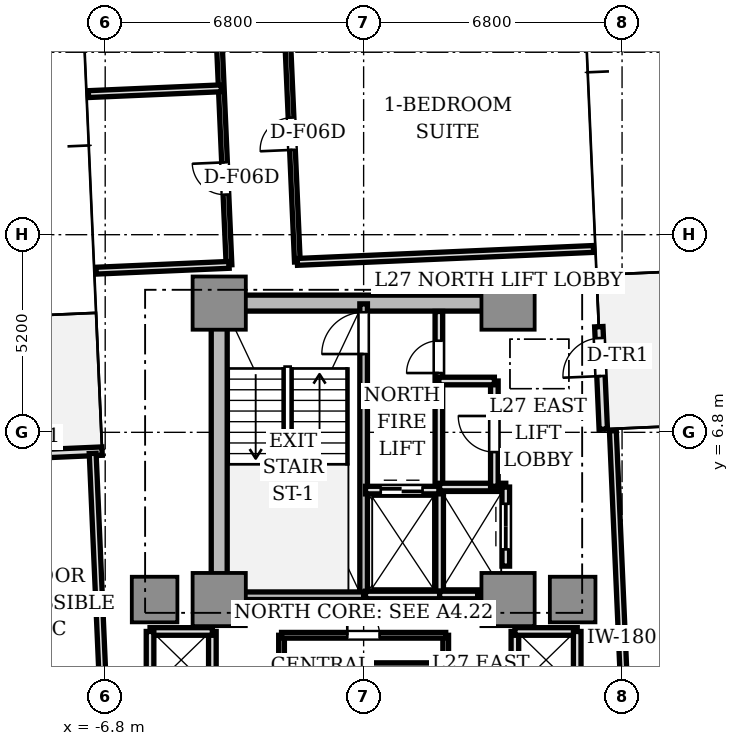
"""IFC4 building model, lengths in metres.
Left out: names, types, materials, properties, quantities, classifications, styles, units other than length and angle.
Written with IfcOpenShell. Run it as: python <this file> out.ifc"""

import sys

from ifc_helpers import new_model, si_unit, direction, frame, frame_2d, origin, origin_2d, place, context, subcontext, project, spatial, rectangle, extrude, source, transform, mapped, element, fill, save


model = new_model("IFC4")
c1 = context("Model", 3, precision=1e-05, world=origin(), true_north=direction((0.0, 1.0)))
c2 = subcontext(c1, "Body", "Model", "MODEL_VIEW")
j1 = project(units=[si_unit("LENGTHUNIT", "METRE"), si_unit("PLANEANGLEUNIT", "RADIAN")], contexts=[c1])
p1 = place(None, origin())
s1 = spatial("IfcSite", under=j1, at=p1, CompositionType="ELEMENT")
p2 = place(p1, origin())
s2 = spatial("IfcBuilding", under=s1, at=p2, CompositionType="ELEMENT")
p3 = place(p2, frame((0.0, 0.0, 100.25)))
s3 = spatial("IfcBuildingStorey", under=s2, at=p3, CompositionType="ELEMENT", Elevation=100.25)
p4 = place(p3, frame((-3.55, 10.2, 0.0), z_axis=(0.0, 0.0, 1.0), x_axis=(1.0, 0.0, 0.0)))
e1 = element("IfcWall", 1, at=p4, inside=s3, PredefinedType="SHEAR", context=c2, shape_type="SweptSolid", body=[
    extrude(rectangle(XDim=7.1, YDim=0.42, at=frame_2d((3.55, 0.0))), origin(), (0.0, 0.0, 1.0), 3.11),
])
p5 = place(p3, frame((-3.8, 2.85, 0.0), z_axis=(0.0, 0.0, 1.0), x_axis=(0.0, 1.0, 0.0)))
e2 = element("IfcWall", 2, at=p5, inside=s3, PredefinedType="SHEAR", context=c2, shape_type="SweptSolid", body=[
    extrude(rectangle(XDim=6.9, YDim=0.42, at=frame_2d((3.45, 0.0))), origin(), (0.0, 0.0, 1.0), 3.11),
])
m1 = source(origin(), c2, "Body", "SweptSolid", [
    extrude(rectangle(XDim=1.4, YDim=1.4, at=origin_2d()), origin(), (0.0, 0.0, 1.0), 3.11),
])
for number, where, z_axis, x_axis in (
    (3, (-3.8, 2.4, 0.0), (0.0, 0.0, 1.0), (1.0, 0.0, 0.0)),
    (4, (3.8, 2.4, 0.0), (0.0, 0.0, 1.0), (1.0, 0.0, 0.0)),
    (5, (-3.8, 10.2, 0.0), (0.0, 0.0, 1.0), (1.0, 0.0, 0.0)),
    (6, (3.8, 10.2, 0.0), (0.0, 0.0, 1.0), (1.0, 0.0, 0.0)),
):
    element("IfcColumn", number, at=place(p3, frame(where, z_axis=z_axis, x_axis=x_axis)), inside=s3, PredefinedType="COLUMN", context=c2, shape_type="MappedRepresentation", body=[
        mapped(m1, transform((0.0, 0.0, 0.0), scale=1.0)),
    ])
m2 = source(origin(), c2, "Body", "SweptSolid", [
    extrude(rectangle(XDim=1.2, YDim=1.2, at=origin_2d()), origin(), (0.0, 0.0, 1.0), 3.11),
])
for number, where, z_axis, x_axis in (
    (7, (5.5, 2.4, 0.0), (0.0, 0.0, 1.0), (1.0, 0.0, 0.0)),
    (8, (-5.5, 2.4, 0.0), (0.0, 0.0, 1.0), (1.0, 0.0, 0.0)),
):
    element("IfcColumn", number, at=place(p3, frame(where, z_axis=z_axis, x_axis=x_axis)), inside=s3, PredefinedType="COLUMN", context=c2, shape_type="MappedRepresentation", body=[
        mapped(m2, transform((0.0, 0.0, 0.0), scale=1.0)),
    ])
p6 = place(p3, frame((6.306, 6.882, 0.0), z_axis=(0.0, 0.0, 1.0), x_axis=(-0.043672655174, 0.999045894436, 0.0)))
e9 = element("IfcWall", 9, at=p6, inside=s3, PredefinedType="STANDARD", context=c2, shape_type="SweptSolid", body=[
    extrude(rectangle(XDim=2.7, YDim=0.22, at=frame_2d((1.35, 0.0))), origin(), (0.0, 0.0, 1.0), 3.11),
])
p7 = place(p6, frame((1.4, 0.0, 0.0)))
e10 = element("IfcOpeningElement", 10, at=p7, cuts=e9, PredefinedType="OPENING", context=c2, shape_type="SweptSolid", body=[
    extrude(rectangle(XDim=1.0, YDim=2.2, at=frame_2d((0.5, 1.1))), frame((0.0, 0.12, 0.0), z_axis=(0.0, -1.0, 0.0), x_axis=(1.0, 0.0, 0.0)), (0.0, 0.0, 1.0), 0.24),
])
p8 = place(p3, frame((-6.882, 6.306, 0.0), z_axis=(0.0, 0.0, 1.0), x_axis=(-0.999045894436, -0.043672655174, 0.0)))
e11 = element("IfcWall", 11, at=p8, inside=s3, PredefinedType="STANDARD", context=c2, shape_type="SweptSolid", body=[
    extrude(rectangle(XDim=2.7, YDim=0.22, at=frame_2d((1.35, 0.0))), origin(), (0.0, 0.0, 1.0), 3.11),
])
p9 = place(p8, frame((1.4, 0.0, 0.0)))
e12 = element("IfcOpeningElement", 12, at=p9, cuts=e11, PredefinedType="OPENING", context=c2, shape_type="SweptSolid", body=[
    extrude(rectangle(XDim=1.0, YDim=2.2, at=frame_2d((0.5, 1.1))), frame((0.0, 0.12, 0.0), z_axis=(0.0, -1.0, 0.0), x_axis=(1.0, 0.0, 0.0)), (0.0, 0.0, 1.0), 0.24),
])
p10 = place(p3, frame((0.0, 2.5, 0.0), z_axis=(0.0, 0.0, 1.0), x_axis=(0.0, 1.0, 0.0)))
e13 = element("IfcWall", 13, at=p10, inside=s3, PredefinedType="SOLIDWALL", context=c2, shape_type="SweptSolid", body=[
    extrude(rectangle(XDim=7.68, YDim=0.2, at=frame_2d((3.84, 0.0))), origin(), (0.0, 0.0, 1.0), 3.11),
])
p11 = place(p10, frame((6.36, 0.0, 0.0)))
e14 = element("IfcOpeningElement", 14, at=p11, cuts=e13, PredefinedType="OPENING", context=c2, shape_type="SweptSolid", body=[
    extrude(rectangle(XDim=1.1, YDim=2.15, at=frame_2d((0.55, 1.075))), frame((0.0, 0.11, 0.0), z_axis=(0.0, -1.0, 0.0), x_axis=(1.0, 0.0, 0.0)), (0.0, 0.0, 1.0), 0.22),
])
p12 = place(p3, frame((-3.72, 2.5, 0.0), z_axis=(0.0, 0.0, 1.0), x_axis=(1.0, 0.0, 0.0)))
e15 = element("IfcWall", 15, at=p12, inside=s3, PredefinedType="SOLIDWALL", context=c2, shape_type="SweptSolid", body=[
    extrude(rectangle(XDim=3.72, YDim=0.2, at=frame_2d((1.86, 0.0))), origin(), (0.0, 0.0, 1.0), 3.11),
])
p13 = place(p3, frame((1.98, 5.32, 0.0), z_axis=(0.0, 0.0, 1.0), x_axis=(0.0, 1.0, 0.0)))
e16 = element("IfcWall", 16, at=p13, inside=s3, PredefinedType="SOLIDWALL", context=c2, shape_type="SweptSolid", body=[
    extrude(rectangle(XDim=4.66, YDim=0.2, at=frame_2d((2.33, 0.0))), origin(), (0.0, 0.0, 1.0), 2.66),
])
p14 = place(p13, frame((3.04, 0.0, 0.0)))
e17 = element("IfcOpeningElement", 17, at=p14, cuts=e16, PredefinedType="OPENING", context=c2, shape_type="SweptSolid", body=[
    extrude(rectangle(XDim=0.85, YDim=2.1, at=frame_2d((0.425, 1.05))), frame((0.0, 0.11, 0.0), z_axis=(0.0, -1.0, 0.0), x_axis=(1.0, 0.0, 0.0)), (0.0, 0.0, 1.0), 0.22),
])
p15 = place(p3, frame((2.0, 2.5, 0.0), z_axis=(0.0, 0.0, 1.0), x_axis=(0.0, 1.0, 0.0)))
e18 = element("IfcWall", 18, at=p15, inside=s3, PredefinedType="SOLIDWALL", context=c2, shape_type="SweptSolid", body=[
    extrude(rectangle(XDim=2.78, YDim=0.2, at=frame_2d((1.39, 0.0))), origin(), (0.0, 0.0, 1.0), 2.66),
])
p16 = place(p3, frame((0.05, 2.52, 0.0), z_axis=(0.0, 0.0, 1.0), x_axis=(1.0, 0.0, 0.0)))
e19 = element("IfcWall", 19, at=p16, inside=s3, PredefinedType="SOLIDWALL", context=c2, shape_type="SweptSolid", body=[
    extrude(rectangle(XDim=1.95, YDim=0.2, at=frame_2d((0.975, 0.0))), origin(), (0.0, 0.0, 1.0), 2.66),
])
p17 = place(p3, frame((0.05, 5.28, 0.0), z_axis=(0.0, 0.0, 1.0), x_axis=(1.0, 0.0, 0.0)))
e20 = element("IfcWall", 20, at=p17, inside=s3, PredefinedType="SOLIDWALL", context=c2, shape_type="SweptSolid", body=[
    extrude(rectangle(XDim=1.93, YDim=0.2, at=frame_2d((0.965, 0.0))), origin(), (0.0, 0.0, 1.0), 2.66),
])
p18 = place(p17, frame((0.4, 0.0, 0.0)))
e21 = element("IfcOpeningElement", 21, at=p18, cuts=e20, PredefinedType="OPENING", context=c2, shape_type="SweptSolid", body=[
    extrude(rectangle(XDim=1.1, YDim=2.2, at=frame_2d((0.55, 1.1))), frame((0.0, 0.11, 0.0), z_axis=(0.0, -1.0, 0.0), x_axis=(1.0, 0.0, 0.0)), (0.0, 0.0, 1.0), 0.22),
])
p19 = place(p3, frame((2.0, 2.52, 0.0), z_axis=(0.0, 0.0, 1.0), x_axis=(1.0, 0.0, 0.0)))
e22 = element("IfcWall", 22, at=p19, inside=s3, PredefinedType="SOLIDWALL", context=c2, shape_type="SweptSolid", body=[
    extrude(rectangle(XDim=1.0, YDim=0.2, at=frame_2d((0.5, 0.0))), origin(), (0.0, 0.0, 1.0), 2.66),
])
p20 = place(p3, frame((2.0, 5.36, 0.0), z_axis=(0.0, 0.0, 1.0), x_axis=(1.0, 0.0, 0.0)))
e23 = element("IfcWall", 23, at=p20, inside=s3, PredefinedType="SOLIDWALL", context=c2, shape_type="SweptSolid", body=[
    extrude(rectangle(XDim=1.74, YDim=0.2, at=frame_2d((0.87, 0.0))), origin(), (0.0, 0.0, 1.0), 2.66),
])
p21 = place(p3, frame((3.74, 3.28, 0.0), z_axis=(0.0, 0.0, 1.0), x_axis=(0.0, 1.0, 0.0)))
e24 = element("IfcWall", 24, at=p21, inside=s3, PredefinedType="SOLIDWALL", context=c2, shape_type="SweptSolid", body=[
    extrude(rectangle(XDim=2.08, YDim=0.2, at=frame_2d((1.04, 0.0))), origin(), (0.0, 0.0, 1.0), 2.66),
])
p22 = place(p21, frame((0.44, 0.0, 0.0)))
e25 = element("IfcOpeningElement", 25, at=p22, cuts=e24, PredefinedType="OPENING", context=c2, shape_type="SweptSolid", body=[
    extrude(rectangle(XDim=1.2, YDim=2.2, at=frame_2d((0.6, 1.1))), frame((0.0, 0.11, 0.0), z_axis=(0.0, -1.0, 0.0), x_axis=(1.0, 0.0, 0.0)), (0.0, 0.0, 1.0), 0.22),
])
p23 = place(p3, frame((3.98, -1.56, 0.0), z_axis=(0.0, 0.0, 1.0), x_axis=(0.0, 1.0, 0.0)))
e26 = element("IfcWall", 26, at=p23, inside=s3, PredefinedType="SOLIDWALL", context=c2, shape_type="SweptSolid", body=[
    extrude(rectangle(XDim=3.12, YDim=0.2, at=frame_2d((1.56, 0.0))), origin(), (0.0, 0.0, 1.0), 2.28),
])
p24 = place(p3, frame((3.98, 1.56, 0.0), z_axis=(0.0, 0.0, 1.0), x_axis=(1.0, 0.0, 0.0)))
e27 = element("IfcWall", 27, at=p24, inside=s3, PredefinedType="SOLIDWALL", context=c2, shape_type="SweptSolid", body=[
    extrude(rectangle(XDim=1.64, YDim=0.2, at=frame_2d((0.82, 0.0))), origin(), (0.0, 0.0, 1.0), 2.66),
])
p25 = place(p3, frame((5.62, 0.0, 0.0), z_axis=(0.0, 0.0, 1.0), x_axis=(0.0, 1.0, 0.0)))
e28 = element("IfcWall", 28, at=p25, inside=s3, PredefinedType="SOLIDWALL", context=c2, shape_type="SweptSolid", body=[
    extrude(rectangle(XDim=1.56, YDim=0.2, at=frame_2d((0.78, 0.0))), origin(), (0.0, 0.0, 1.0), 2.66),
])
p26 = place(p3, frame((-3.98, -1.56, 0.0), z_axis=(0.0, 0.0, 1.0), x_axis=(0.0, 1.0, 0.0)))
e29 = element("IfcWall", 29, at=p26, inside=s3, PredefinedType="SOLIDWALL", context=c2, shape_type="SweptSolid", body=[
    extrude(rectangle(XDim=3.12, YDim=0.2, at=frame_2d((1.56, 0.0))), origin(), (0.0, 0.0, 1.0), 2.28),
])
p27 = place(p3, frame((-5.62, 1.56, 0.0), z_axis=(0.0, 0.0, 1.0), x_axis=(1.0, 0.0, 0.0)))
e30 = element("IfcWall", 30, at=p27, inside=s3, PredefinedType="SOLIDWALL", context=c2, shape_type="SweptSolid", body=[
    extrude(rectangle(XDim=1.64, YDim=0.2, at=frame_2d((0.82, 0.0))), origin(), (0.0, 0.0, 1.0), 2.66),
])
p28 = place(p3, frame((-5.62, 0.0, 0.0), z_axis=(0.0, 0.0, 1.0), x_axis=(0.0, 1.0, 0.0)))
e31 = element("IfcWall", 31, at=p28, inside=s3, PredefinedType="SOLIDWALL", context=c2, shape_type="SweptSolid", body=[
    extrude(rectangle(XDim=1.56, YDim=0.2, at=frame_2d((0.78, 0.0))), origin(), (0.0, 0.0, 1.0), 2.66),
])
p29 = place(p3, frame((3.44, 5.38, 0.0), z_axis=(0.0, 0.0, 1.0), x_axis=(0.0, 1.0, 0.0)))
e32 = element("IfcWall", 32, at=p29, inside=s3, PredefinedType="SOLIDWALL", context=c2, shape_type="SweptSolid", body=[
    extrude(rectangle(XDim=2.77, YDim=0.2, at=frame_2d((1.385, 0.0))), origin(), (0.0, 0.0, 1.0), 2.66),
])
p30 = place(p29, frame((0.9, 0.0, 0.0)))
e33 = element("IfcOpeningElement", 33, at=p30, cuts=e32, PredefinedType="OPENING", context=c2, shape_type="SweptSolid", body=[
    extrude(rectangle(XDim=0.95, YDim=2.15, at=frame_2d((0.475, 1.075))), frame((0.0, 0.11, 0.0), z_axis=(0.0, -1.0, 0.0), x_axis=(1.0, 0.0, 0.0)), (0.0, 0.0, 1.0), 0.22),
])
p31 = place(p3, frame((1.98, 8.15, 0.0), z_axis=(0.0, 0.0, 1.0), x_axis=(1.0, 0.0, 0.0)))
e34 = element("IfcWall", 34, at=p31, inside=s3, PredefinedType="SOLIDWALL", context=c2, shape_type="SweptSolid", body=[
    extrude(rectangle(XDim=1.46, YDim=0.2, at=frame_2d((0.73, 0.0))), origin(), (0.0, 0.0, 1.0), 2.66),
])
p32 = place(p3, frame((2.16, -1.46, 0.0), z_axis=(0.0, 0.0, 1.0), x_axis=(0.0, 1.0, 0.0)))
e35 = element("IfcWall", 35, at=p32, inside=s3, PredefinedType="PARTITIONING", context=c2, shape_type="SweptSolid", body=[
    extrude(rectangle(XDim=2.92, YDim=0.15, at=frame_2d((1.46, 0.0))), origin(), (0.0, 0.0, 1.0), 2.66),
])
p33 = place(p32, frame((1.035, 0.0, 0.0)))
e36 = element("IfcOpeningElement", 36, at=p33, cuts=e35, PredefinedType="OPENING", context=c2, shape_type="SweptSolid", body=[
    extrude(rectangle(XDim=0.85, YDim=2.1, at=frame_2d((0.425, 1.05))), frame((0.0, 0.085, 0.0), z_axis=(0.0, -1.0, 0.0), x_axis=(1.0, 0.0, 0.0)), (0.0, 0.0, 1.0), 0.17),
])
p34 = place(p3, frame((-2.16, -1.46, 0.0), z_axis=(0.0, 0.0, 1.0), x_axis=(0.0, 1.0, 0.0)))
e37 = element("IfcWall", 37, at=p34, inside=s3, PredefinedType="PARTITIONING", context=c2, shape_type="SweptSolid", body=[
    extrude(rectangle(XDim=2.92, YDim=0.15, at=frame_2d((1.46, 0.0))), origin(), (0.0, 0.0, 1.0), 2.66),
])
p35 = place(p3, frame((-2.16, 1.46, 0.0), z_axis=(0.0, 0.0, 1.0), x_axis=(1.0, 0.0, 0.0)))
e38 = element("IfcWall", 38, at=p35, inside=s3, PredefinedType="PARTITIONING", context=c2, shape_type="SweptSolid", body=[
    extrude(rectangle(XDim=4.32, YDim=0.15, at=frame_2d((2.16, 0.0))), origin(), (0.0, 0.0, 1.0), 2.66),
])
p36 = place(p35, frame((1.73, 0.0, 0.0)))
e39 = element("IfcOpeningElement", 39, at=p36, cuts=e38, PredefinedType="OPENING", context=c2, shape_type="SweptSolid", body=[
    extrude(rectangle(XDim=0.85, YDim=2.1, at=frame_2d((0.425, 1.05))), frame((0.0, 0.085, 0.0), z_axis=(0.0, -1.0, 0.0), x_axis=(1.0, 0.0, 0.0)), (0.0, 0.0, 1.0), 0.17),
])
p37 = place(p3, frame((-2.16, 0.66, 0.0), z_axis=(0.0, 0.0, 1.0), x_axis=(1.0, 0.0, 0.0)))
e40 = element("IfcWall", 40, at=p37, inside=s3, PredefinedType="PARTITIONING", context=c2, shape_type="SweptSolid", body=[
    extrude(rectangle(XDim=4.32, YDim=0.15, at=frame_2d((2.16, 0.0))), origin(), (0.0, 0.0, 1.0), 2.66),
])
p38 = place(p3, frame((7.033, -4.047, 0.0), z_axis=(0.0, 0.0, 1.0), x_axis=(-0.043609267053, 0.999048663393, 0.0)))
e41 = element("IfcWall", 41, at=p38, inside=s3, PredefinedType="PARTITIONING", context=c2, shape_type="SweptSolid", body=[
    extrude(rectangle(XDim=10.9, YDim=0.18, at=frame_2d((5.45, 0.0))), origin(), (0.0, 0.0, 1.0), 2.66),
])
p39 = place(p3, frame((-3.542, 11.206, 0.0), z_axis=(0.0, 0.0, 1.0), x_axis=(-0.043604692074, 0.999048863084, 0.0)))
e42 = element("IfcWall", 42, at=p39, inside=s3, PredefinedType="PARTITIONING", context=c2, shape_type="SweptSolid", body=[
    extrude(rectangle(XDim=9.3, YDim=0.15, at=frame_2d((4.65, 0.0))), origin(), (0.0, 0.0, 1.0), 2.66),
])
p40 = place(p39, frame((1.85, 0.0, 0.0)))
e43 = element("IfcOpeningElement", 43, at=p40, cuts=e42, PredefinedType="OPENING", context=c2, shape_type="SweptSolid", body=[
    extrude(rectangle(XDim=0.85, YDim=2.1, at=frame_2d((0.425, 1.05))), frame((0.0, 0.085, 0.0), z_axis=(0.0, -1.0, 0.0), x_axis=(1.0, 0.0, 0.0)), (0.0, 0.0, 1.0), 0.17),
])
p41 = place(p39, frame((6.5, 0.0, 0.0)))
e44 = element("IfcOpeningElement", 44, at=p41, cuts=e42, PredefinedType="OPENING", context=c2, shape_type="SweptSolid", body=[
    extrude(rectangle(XDim=0.85, YDim=2.1, at=frame_2d((0.425, 1.05))), frame((0.0, 0.085, 0.0), z_axis=(0.0, -1.0, 0.0), x_axis=(1.0, 0.0, 0.0)), (0.0, 0.0, 1.0), 0.17),
])
p42 = place(p3, frame((-1.744, 11.285, 0.0), z_axis=(0.0, 0.0, 1.0), x_axis=(-0.043630894187, 0.999047719117, 0.0)))
e45 = element("IfcWall", 45, at=p42, inside=s3, PredefinedType="PARTITIONING", context=c2, shape_type="SweptSolid", body=[
    extrude(rectangle(XDim=9.3, YDim=0.15, at=frame_2d((4.65, 0.0))), origin(), (0.0, 0.0, 1.0), 2.66),
])
p43 = place(p42, frame((2.95, 0.0, 0.0)))
e46 = element("IfcOpeningElement", 46, at=p43, cuts=e45, PredefinedType="OPENING", context=c2, shape_type="SweptSolid", body=[
    extrude(rectangle(XDim=0.85, YDim=2.1, at=frame_2d((0.425, 1.05))), frame((0.0, 0.085, 0.0), z_axis=(0.0, -1.0, 0.0), x_axis=(1.0, 0.0, 0.0)), (0.0, 0.0, 1.0), 0.17),
])
p44 = place(p3, frame((-3.542, 11.206, 0.0), z_axis=(0.0, 0.0, 1.0), x_axis=(-0.999046129111, -0.04366728647, 0.0)))
e47 = element("IfcWall", 47, at=p44, inside=s3, PredefinedType="PARTITIONING", context=c2, shape_type="SweptSolid", body=[
    extrude(rectangle(XDim=3.5, YDim=0.18, at=frame_2d((1.75, 0.0))), origin(), (0.0, 0.0, 1.0), 2.66),
])
p45 = place(p3, frame((6.049, 11.625, 0.0), z_axis=(0.0, 0.0, 1.0), x_axis=(-0.999047634936, -0.043632821702, 0.0)))
e48 = element("IfcWall", 48, at=p45, inside=s3, PredefinedType="PARTITIONING", context=c2, shape_type="SweptSolid", body=[
    extrude(rectangle(XDim=7.8, YDim=0.18, at=frame_2d((3.9, 0.0))), origin(), (0.0, 0.0, 1.0), 2.66),
])
p46 = place(p3, frame((-3.745, 15.852, 0.0), z_axis=(0.0, 0.0, 1.0), x_axis=(-0.999049169846, -0.043597663116, 0.0)))
e49 = element("IfcWall", 49, at=p46, inside=s3, PredefinedType="PARTITIONING", context=c2, shape_type="SweptSolid", body=[
    extrude(rectangle(XDim=3.5, YDim=0.18, at=frame_2d((1.75, 0.0))), origin(), (0.0, 0.0, 1.0), 2.66),
])
p47 = place(p3, frame((-7.129, 6.245, 0.0), z_axis=(0.0, 0.0, 1.0), x_axis=(0.043600217373, -0.999049058378, 0.0)))
e50 = element("IfcWall", 50, at=p47, inside=s3, PredefinedType="PARTITIONING", context=c2, shape_type="SweptSolid", body=[
    extrude(rectangle(XDim=7.8, YDim=0.18, at=frame_2d((3.9, 0.0))), origin(), (0.0, 0.0, 1.0), 2.66),
])
m3 = source(origin(), c2, "Body", "SweptSolid", [
    extrude(rectangle(XDim=1.0, YDim=0.05, at=origin_2d()), origin(), (0.0, 0.0, 1.0), 2.2),
])
p48 = place(p7, frame((0.5, 0.0, 0.0)))
e51 = element("IfcDoor", 51, at=p48, inside=s3, OperationType="SINGLE_SWING_LEFT", PredefinedType="DOOR", context=c2, shape_type="MappedRepresentation", body=[
    mapped(m3, transform((0.0, 0.0, 0.0), scale=1.0)),
])
fill(e10, e51)
m4 = source(origin(), c2, "Body", "SweptSolid", [
    extrude(rectangle(XDim=1.1, YDim=0.05, at=origin_2d()), origin(), (0.0, 0.0, 1.0), 2.15),
])
p49 = place(p11, frame((0.55, 0.0, 0.0)))
e52 = element("IfcDoor", 52, at=p49, inside=s3, OperationType="SINGLE_SWING_LEFT", PredefinedType="DOOR", context=c2, shape_type="MappedRepresentation", body=[
    mapped(m4, transform((0.0, 0.0, 0.0), scale=1.0)),
])
fill(e14, e52)
m5 = source(origin(), c2, "Body", "SweptSolid", [
    extrude(rectangle(XDim=0.85, YDim=0.05, at=origin_2d()), origin(), (0.0, 0.0, 1.0), 2.1),
])
p50 = place(p14, frame((0.425, 0.0, 0.0)))
e53 = element("IfcDoor", 53, at=p50, inside=s3, OperationType="SINGLE_SWING_LEFT", PredefinedType="DOOR", context=c2, shape_type="MappedRepresentation", body=[
    mapped(m5, transform((0.0, 0.0, 0.0), scale=1.0)),
])
fill(e17, e53)
m6 = source(origin(), c2, "Body", "SweptSolid", [
    extrude(rectangle(XDim=1.1, YDim=0.05, at=origin_2d()), origin(), (0.0, 0.0, 1.0), 2.2),
])
p51 = place(p18, frame((0.55, 0.0, 0.0)))
e54 = element("IfcDoor", 54, at=p51, inside=s3, OperationType="DOUBLE_DOOR_SLIDING", PredefinedType="DOOR", context=c2, shape_type="MappedRepresentation", body=[
    mapped(m6, transform((0.0, 0.0, 0.0), scale=1.0)),
])
fill(e21, e54)
m7 = source(origin(), c2, "Body", "SweptSolid", [
    extrude(rectangle(XDim=1.2, YDim=0.05, at=origin_2d()), origin(), (0.0, 0.0, 1.0), 2.2),
])
p52 = place(p22, frame((0.6, 0.0, 0.0)))
e55 = element("IfcDoor", 55, at=p52, inside=s3, OperationType="DOUBLE_DOOR_SLIDING", PredefinedType="DOOR", context=c2, shape_type="MappedRepresentation", body=[
    mapped(m7, transform((0.0, 0.0, 0.0), scale=1.0)),
])
fill(e25, e55)
m8 = source(origin(), c2, "Body", "SweptSolid", [
    extrude(rectangle(XDim=0.95, YDim=0.05, at=origin_2d()), origin(), (0.0, 0.0, 1.0), 2.15),
])
p53 = place(p30, frame((0.475, 0.0, 0.0)))
e56 = element("IfcDoor", 56, at=p53, inside=s3, OperationType="SINGLE_SWING_RIGHT", PredefinedType="DOOR", context=c2, shape_type="MappedRepresentation", body=[
    mapped(m8, transform((0.0, 0.0, 0.0), scale=1.0)),
])
fill(e33, e56)
p54 = place(p36, frame((0.425, 0.0, 0.0)))
e57 = element("IfcDoor", 57, at=p54, inside=s3, OperationType="SINGLE_SWING_LEFT", PredefinedType="DOOR", context=c2, shape_type="MappedRepresentation", body=[
    mapped(m5, transform((0.0, 0.0, 0.0), scale=1.0)),
])
fill(e39, e57)
p55 = place(p40, frame((0.425, 0.0, 0.0)))
e58 = element("IfcDoor", 58, at=p55, inside=s3, OperationType="SINGLE_SWING_RIGHT", PredefinedType="DOOR", context=c2, shape_type="MappedRepresentation", body=[
    mapped(m5, transform((0.0, 0.0, 0.0), scale=1.0)),
])
fill(e43, e58)
p56 = place(p43, frame((0.425, 0.0, 0.0)))
e59 = element("IfcDoor", 59, at=p56, inside=s3, OperationType="SINGLE_SWING_LEFT", PredefinedType="DOOR", context=c2, shape_type="MappedRepresentation", body=[
    mapped(m5, transform((0.0, 0.0, 0.0), scale=1.0)),
])
fill(e46, e59)
save(model, sys.argv[1])
